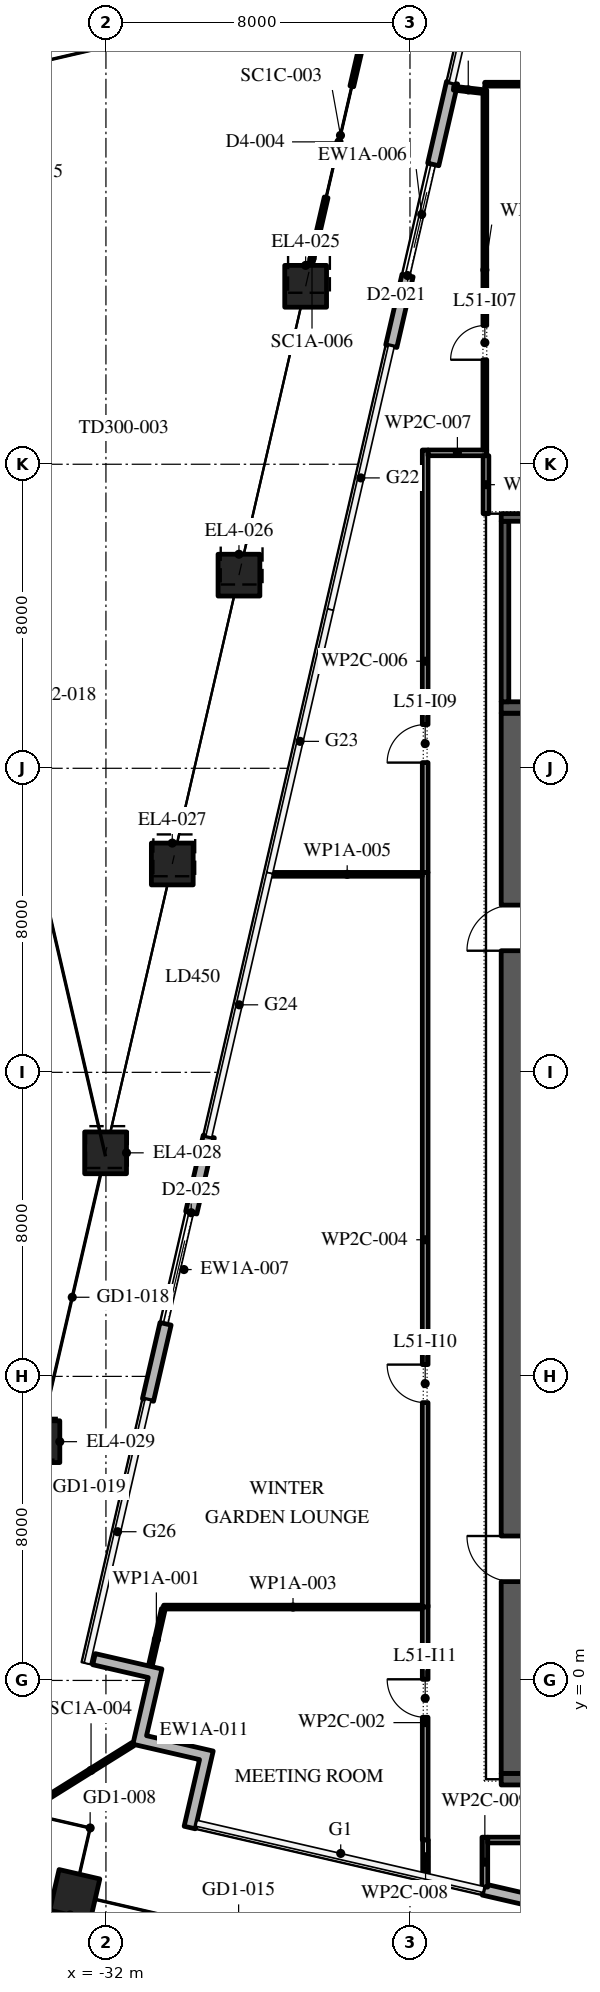
"""IFC4 building model, lengths in metres.
Left out: names, types, materials, properties, quantities, classifications, styles, units other than length and angle.
Written with IfcOpenShell. Run it as: python <this file> out.ifc"""

import sys

from ifc_helpers import new_model, si_unit, direction, frame, frame_2d, origin, origin_2d, place, context, subcontext, project, spatial, polyline, rectangle, outline, extrude, element, fill, save


model = new_model("IFC4")
c1 = context("Model", 3, precision=1e-05, world=origin(), true_north=direction((0.0, 1.0)))
c2 = subcontext(c1, "Body", "Model", "MODEL_VIEW")
j1 = project(units=[si_unit("LENGTHUNIT", "METRE"), si_unit("PLANEANGLEUNIT", "RADIAN")], contexts=[c1])
p1 = place(None, origin())
s1 = spatial("IfcSite", under=j1, at=p1, CompositionType="ELEMENT")
p2 = place(p1, origin())
s2 = spatial("IfcBuilding", under=s1, at=p2, CompositionType="ELEMENT")
p3 = place(p2, frame((0.0, 0.0, 237.0)))
s3 = spatial("IfcBuildingStorey", under=s2, at=p3, CompositionType="ELEMENT", Elevation=237.0)
p4 = place(p3, frame((-32.821, -5.635, 0.0), z_axis=(0.0, 0.0, 1.0), x_axis=(0.974370064785, -0.224951054344, 0.0)))
e1 = element("IfcColumn", 1, at=p4, inside=s3, PredefinedType="COLUMN", context=c2, shape_type="SweptSolid", body=[
    extrude(rectangle(XDim=1.1, YDim=1.1, at=origin_2d()), origin(), (0.0, 0.0, 1.0), 6.0),
])
p5 = place(p3, frame((-26.745, 36.682, 0.0), z_axis=(0.014577044955, 0.063140125085, 0.997898208418), x_axis=(-0.974370069894, 0.224951032214, 0.0)))
e2 = element("IfcColumn", 2, at=p5, inside=s3, PredefinedType="COLUMN", context=c2, shape_type="SweptSolid", body=[
    extrude(rectangle(XDim=1.1, YDim=1.1, at=origin_2d()), origin(), (0.0, 0.0, 1.0), 6.013),
])
p6 = place(p3, frame((-28.5, 29.082, 0.0), z_axis=(0.011702964216, 0.050550303766, 0.998652946432), x_axis=(-0.974232565058, 0.225545802843, 0.0)))
e3 = element("IfcColumn", 3, at=p6, inside=s3, PredefinedType="COLUMN", context=c2, shape_type="SweptSolid", body=[
    extrude(rectangle(XDim=1.1, YDim=1.1, at=origin_2d()), origin(), (0.0, 0.0, 1.0), 6.008),
])
p7 = place(p3, frame((-30.255, 21.482, 0.0), z_axis=(0.008782396982, 0.037935075853, 0.999241612186), x_axis=(-0.974232565058, 0.225545802843, 0.0)))
e4 = element("IfcColumn", 4, at=p7, inside=s3, PredefinedType="COLUMN", context=c2, shape_type="SweptSolid", body=[
    extrude(rectangle(XDim=1.1, YDim=1.1, at=origin_2d()), origin(), (0.0, 0.0, 1.0), 6.005),
])
p8 = place(p3, frame((-32.009, 13.882, 0.0), z_axis=(0.005857398783, 0.025300708632, 0.999662725634), x_axis=(-0.974232565058, 0.225545802843, 0.0)))
e5 = element("IfcColumn", 5, at=p8, inside=s3, PredefinedType="COLUMN", context=c2, shape_type="SweptSolid", body=[
    extrude(rectangle(XDim=1.1, YDim=1.1, at=origin_2d()), origin(), (0.0, 0.0, 1.0), 6.002),
])
p9 = place(p3, frame((-33.764, 6.282, 0.0), z_axis=(0.002929440379, 0.012653554971, 0.999915649405), x_axis=(-0.974232565058, 0.225545802843, 0.0)))
e6 = element("IfcColumn", 6, at=p9, inside=s3, PredefinedType="COLUMN", context=c2, shape_type="SweptSolid", body=[
    extrude(rectangle(XDim=1.1, YDim=1.1, at=origin_2d()), origin(), (0.0, 0.0, 1.0), 6.0),
])
p10 = place(p3, frame((-22.065, -5.502, 0.0), z_axis=(0.0, 0.0, 1.0), x_axis=(0.974372279954, -0.224941459176, 0.0)))
e7 = element("IfcWall", 7, at=p10, inside=s3, PredefinedType="STANDARD", context=c2, shape_type="SweptSolid", body=[
    extrude(rectangle(XDim=8.05, YDim=0.3, at=frame_2d((4.025, 0.0))), origin(), (0.0, 0.0, 1.0), 5.8),
])
p11 = place(p10, frame((2.525, 0.0, 0.0)))
e8 = element("IfcOpeningElement", 8, at=p11, cuts=e7, PredefinedType="OPENING", context=c2, shape_type="SweptSolid", body=[
    extrude(rectangle(XDim=3.0, YDim=3.5, at=frame_2d((1.5, 1.75))), frame((0.0, 0.16, 0.0), z_axis=(0.0, -1.0, 0.0), x_axis=(1.0, 0.0, 0.0)), (0.0, 0.0, 1.0), 0.32),
])
p12 = place(p3, frame((-22.892, 42.039, 0.0), z_axis=(0.0, 0.0, 1.0), x_axis=(-0.224982313536, -0.974362847504, 0.0)))
e9 = element("IfcWall", 9, at=p12, inside=s3, PredefinedType="STANDARD", context=c2, shape_type="SweptSolid", body=[
    extrude(rectangle(XDim=7.114, YDim=0.3, at=frame_2d((3.557, 0.0))), origin(), (0.0, 0.0, 1.0), 5.8),
])
p13 = place(p12, frame((2.207, 0.0, 0.0)))
e10 = element("IfcOpeningElement", 10, at=p13, cuts=e9, PredefinedType="OPENING", context=c2, shape_type="SweptSolid", body=[
    extrude(rectangle(XDim=3.0, YDim=3.5, at=frame_2d((1.5, 1.75))), frame((0.0, 0.16, 0.0), z_axis=(0.0, -1.0, 0.0), x_axis=(1.0, 0.0, 0.0)), (0.0, 0.0, 1.0), 0.32),
])
p14 = place(p3, frame((-29.293, 14.311, 0.0), z_axis=(0.0, 0.0, 1.0), x_axis=(-0.224949733175, -0.9743703698, 0.0)))
e11 = element("IfcWall", 11, at=p14, inside=s3, PredefinedType="STANDARD", context=c2, shape_type="SweptSolid", body=[
    extrude(rectangle(XDim=7.114, YDim=0.3, at=frame_2d((3.557, 0.0))), origin(), (0.0, 0.0, 1.0), 5.8),
])
p15 = place(p14, frame((2.057, 0.0, 0.0)))
e12 = element("IfcOpeningElement", 12, at=p15, cuts=e11, PredefinedType="OPENING", context=c2, shape_type="SweptSolid", body=[
    extrude(rectangle(XDim=3.0, YDim=3.5, at=frame_2d((1.5, 1.75))), frame((0.0, 0.16, 0.0), z_axis=(0.0, -1.0, 0.0), x_axis=(1.0, 0.0, 0.0)), (0.0, 0.0, 1.0), 0.32),
])
p16 = place(p3, origin())
e13 = element("IfcWall", 13, at=p16, inside=s3, PredefinedType="STANDARD", context=c2, shape_type="SweptSolid", body=[
    extrude(outline(polyline([(-31.291, -1.678), (-30.886, 0.076), (-32.348, 0.413), (-32.28, 0.705), (-30.526, 0.301), (-30.931, -1.453), (-29.177, -1.858), (-29.65, -3.905), (-29.942, -3.837), (-29.537, -2.083), (-31.291, -1.678)])), origin(), (0.0, 0.0, 1.0), 5.8),
])
p17 = place(p3, frame((-31.291, -1.678, 0.0), z_axis=(0.0, 0.0, 1.0), x_axis=(-0.84807753525, -0.529872148923, 0.0)))
e14 = element("IfcWall", 14, at=p17, inside=s3, PredefinedType="STANDARD", context=c2, shape_type="SweptSolid", body=[
    extrude(rectangle(XDim=2.596, YDim=0.1, at=frame_2d((1.298, 0.0))), origin(), (0.0, 0.0, 1.0), 5.8),
])
p18 = place(p3, frame((-25.119, 43.727, 0.0), z_axis=(0.0, 0.0, 1.0), x_axis=(-0.224972527218, -0.974365107132, 0.0)))
e15 = element("IfcWall", 15, at=p18, inside=s3, PredefinedType="STANDARD", context=c2, shape_type="SweptSolid", body=[
    extrude(rectangle(XDim=6.311, YDim=0.1, at=frame_2d((3.155, 0.0))), origin(), (0.0, 0.0, 1.0), 4.85),
])
p19 = place(p18, frame((1.83, 0.0, 0.0)))
e16 = element("IfcOpeningElement", 16, at=p19, cuts=e15, PredefinedType="OPENING", context=c2, shape_type="SweptSolid", body=[
    extrude(rectangle(XDim=3.0, YDim=3.5, at=frame_2d((1.5, 1.75))), frame((0.0, 0.06, 0.0), z_axis=(0.0, -1.0, 0.0), x_axis=(1.0, 0.0, 0.0)), (0.0, 0.0, 1.0), 0.12),
])
p20 = place(p3, frame((-21.3, -2.45, 0.0), z_axis=(0.0, 0.0, 1.0), x_axis=(0.0, 1.0, 0.0)))
e17 = element("IfcWall", 17, at=p20, inside=s3, PredefinedType="SHEAR", context=c2, shape_type="SweptSolid", body=[
    extrude(rectangle(XDim=27.9, YDim=0.6, at=frame_2d((13.95, 0.0))), origin(), (0.0, 0.0, 1.0), 5.8),
])
p21 = place(p20, frame((5.05, 0.0, 0.0)))
e18 = element("IfcOpeningElement", 18, at=p21, cuts=e17, PredefinedType="OPENING", context=c2, shape_type="SweptSolid", body=[
    extrude(rectangle(XDim=1.2, YDim=2.1, at=frame_2d((0.6, 1.05))), frame((0.0, 0.31, 0.0), z_axis=(0.0, -1.0, 0.0), x_axis=(1.0, 0.0, 0.0)), (0.0, 0.0, 1.0), 0.62),
])
p22 = place(p20, frame((21.65, 0.0, 0.0)))
e19 = element("IfcOpeningElement", 19, at=p22, cuts=e17, PredefinedType="OPENING", context=c2, shape_type="SweptSolid", body=[
    extrude(rectangle(XDim=1.2, YDim=2.1, at=frame_2d((0.6, 1.05))), frame((0.0, 0.31, 0.0), z_axis=(0.0, -1.0, 0.0), x_axis=(1.0, 0.0, 0.0)), (0.0, 0.0, 1.0), 0.62),
])
for number, where, z_axis, x_axis in (
    (20, (-21.6, -2.6, 0.0), (0.0, 0.0, 1.0), (1.0, 0.0, 0.0)),
    (21, (-21.6, 25.6, 0.0), (0.0, 0.0, 1.0), (1.0, 0.0, 0.0)),
):
    element("IfcWall", number, at=place(p3, frame(where, z_axis=z_axis, x_axis=x_axis)), inside=s3, PredefinedType="SHEAR", context=c2, shape_type="SweptSolid", body=[
        extrude(rectangle(XDim=11.2, YDim=0.3, at=frame_2d((5.6, 0.0))), origin(), (0.0, 0.0, 1.0), 5.8),
    ])
p23 = place(p3, frame((-21.5, 25.75, 0.0), z_axis=(0.0, 0.0, 1.0), x_axis=(0.0, 1.0, 0.0)))
e22 = element("IfcWall", 22, at=p23, inside=s3, PredefinedType="SHEAR", context=c2, shape_type="SweptSolid", body=[
    extrude(rectangle(XDim=4.75, YDim=0.2, at=frame_2d((2.375, 0.0))), origin(), (0.0, 0.0, 1.0), 5.8),
])
p24 = place(p3, frame((-21.6, 30.6, 0.0), z_axis=(0.0, 0.0, 1.0), x_axis=(1.0, 0.0, 0.0)))
e23 = element("IfcWall", 23, at=p24, inside=s3, PredefinedType="SHEAR", context=c2, shape_type="SweptSolid", body=[
    extrude(rectangle(XDim=11.2, YDim=0.2, at=frame_2d((5.6, 0.0))), origin(), (0.0, 0.0, 1.0), 5.8),
])
p25 = place(p3, frame((-30.49, 1.88, 0.0), z_axis=(0.0, 0.0, 1.0), x_axis=(-0.222184834458, -0.975004563752, 0.0)))
e24 = element("IfcWall", 24, at=p25, inside=s3, PredefinedType="PARTITIONING", context=c2, shape_type="SweptSolid", body=[
    extrude(rectangle(XDim=1.647, YDim=0.1, at=frame_2d((0.824, 0.0))), origin(), (0.0, 0.0, 1.0), 5.8),
])
p26 = place(p3, frame((-23.6, -4.2, 0.0), z_axis=(0.0, 0.0, 1.0), x_axis=(0.0, 1.0, 0.0)))
e25 = element("IfcWall", 25, at=p26, inside=s3, PredefinedType="PARTITIONING", context=c2, shape_type="SweptSolid", body=[
    extrude(rectangle(XDim=6.18, YDim=0.15, at=frame_2d((3.09, 0.0))), origin(), (0.0, 0.0, 1.0), 5.8),
])
p27 = place(p26, frame((3.23, 0.0, 0.0)))
e26 = element("IfcOpeningElement", 26, at=p27, cuts=e25, PredefinedType="OPENING", context=c2, shape_type="SweptSolid", body=[
    extrude(rectangle(XDim=1.0, YDim=2.1, at=frame_2d((0.5, 1.05))), frame((0.0, 0.085, 0.0), z_axis=(0.0, -1.0, 0.0), x_axis=(1.0, 0.0, 0.0)), (0.0, 0.0, 1.0), 0.17),
])
p28 = place(p3, frame((-23.675, 1.93, 0.0), z_axis=(0.0, 0.0, 1.0), x_axis=(-1.0, 0.0, 0.0)))
e27 = element("IfcWall", 27, at=p28, inside=s3, PredefinedType="PARTITIONING", context=c2, shape_type="SweptSolid", body=[
    extrude(rectangle(XDim=6.805, YDim=0.1, at=frame_2d((3.402, 0.0))), origin(), (0.0, 0.0, 1.0), 5.8),
])
p29 = place(p3, frame((-23.6, 1.93, 0.0), z_axis=(0.0, 0.0, 1.0), x_axis=(0.0, 1.0, 0.0)))
e28 = element("IfcWall", 28, at=p29, inside=s3, PredefinedType="PARTITIONING", context=c2, shape_type="SweptSolid", body=[
    extrude(rectangle(XDim=19.33, YDim=0.15, at=frame_2d((9.665, 0.0))), origin(), (0.0, 0.0, 1.0), 5.8),
])
p30 = place(p29, frame((5.38, 0.0, 0.0)))
e29 = element("IfcOpeningElement", 29, at=p30, cuts=e28, PredefinedType="OPENING", context=c2, shape_type="SweptSolid", body=[
    extrude(rectangle(XDim=1.0, YDim=2.1, at=frame_2d((0.5, 1.05))), frame((0.0, 0.085, 0.0), z_axis=(0.0, -1.0, 0.0), x_axis=(1.0, 0.0, 0.0)), (0.0, 0.0, 1.0), 0.17),
])
p31 = place(p3, frame((-23.675, 21.21, 0.0), z_axis=(0.0, 0.0, 1.0), x_axis=(-1.0, 0.0, 0.0)))
e30 = element("IfcWall", 30, at=p31, inside=s3, PredefinedType="PARTITIONING", context=c2, shape_type="SweptSolid", body=[
    extrude(rectangle(XDim=3.954, YDim=0.1, at=frame_2d((1.977, 0.0))), origin(), (0.0, 0.0, 1.0), 5.8),
])
p32 = place(p3, frame((-23.6, 21.26, 0.0), z_axis=(0.0, 0.0, 1.0), x_axis=(0.0, 1.0, 0.0)))
e31 = element("IfcWall", 31, at=p32, inside=s3, PredefinedType="PARTITIONING", context=c2, shape_type="SweptSolid", body=[
    extrude(rectangle(XDim=11.115, YDim=0.15, at=frame_2d((5.558, 0.0))), origin(), (0.0, 0.0, 1.0), 5.8),
])
p33 = place(p32, frame((2.89, 0.0, 0.0)))
e32 = element("IfcOpeningElement", 32, at=p33, cuts=e31, PredefinedType="OPENING", context=c2, shape_type="SweptSolid", body=[
    extrude(rectangle(XDim=1.0, YDim=2.1, at=frame_2d((0.5, 1.05))), frame((0.0, 0.085, 0.0), z_axis=(0.0, -1.0, 0.0), x_axis=(1.0, 0.0, 0.0)), (0.0, 0.0, 1.0), 0.17),
])
p34 = place(p3, frame((-23.525, 32.3, 0.0), z_axis=(0.0, 0.0, 1.0), x_axis=(1.0, 0.0, 0.0)))
e33 = element("IfcWall", 33, at=p34, inside=s3, PredefinedType="PARTITIONING", context=c2, shape_type="SweptSolid", body=[
    extrude(rectangle(XDim=1.545, YDim=0.15, at=frame_2d((0.772, 0.0))), origin(), (0.0, 0.0, 1.0), 5.8),
])
p35 = place(p3, frame((-23.59, -5.078, 0.0), z_axis=(0.0, 0.0, 1.0), x_axis=(0.0, 1.0, 0.0)))
e34 = element("IfcWall", 34, at=p35, inside=s3, PredefinedType="PARTITIONING", context=c2, shape_type="SweptSolid", body=[
    extrude(rectangle(XDim=0.878, YDim=0.15, at=frame_2d((0.439, 0.0))), origin(), (0.0, 0.0, 1.0), 5.8),
])
p36 = place(p3, frame((-22.03, -4.125, 0.0), z_axis=(0.0, 0.0, 1.0), x_axis=(0.0, -1.0, 0.0)))
e35 = element("IfcWall", 35, at=p36, inside=s3, PredefinedType="PARTITIONING", context=c2, shape_type="SweptSolid", body=[
    extrude(rectangle(XDim=1.313, YDim=0.15, at=frame_2d((0.656, 0.0))), origin(), (0.0, 0.0, 1.0), 5.8),
])
p37 = place(p3, frame((-22.03, 32.375, 0.0), z_axis=(0.0, 0.0, 1.0), x_axis=(0.0, 1.0, 0.0)))
e36 = element("IfcWall", 36, at=p37, inside=s3, PredefinedType="PARTITIONING", context=c2, shape_type="SweptSolid", body=[
    extrude(rectangle(XDim=9.475, YDim=0.1, at=frame_2d((4.738, 0.0))), origin(), (0.0, 0.0, 1.0), 5.8),
])
p38 = place(p37, frame((2.375, 0.0, 0.0)))
e37 = element("IfcOpeningElement", 37, at=p38, cuts=e36, PredefinedType="OPENING", context=c2, shape_type="SweptSolid", body=[
    extrude(rectangle(XDim=0.9, YDim=2.1, at=frame_2d((0.45, 1.05))), frame((0.0, 0.06, 0.0), z_axis=(0.0, -1.0, 0.0), x_axis=(1.0, 0.0, 0.0)), (0.0, 0.0, 1.0), 0.12),
])
p39 = place(p3, frame((-22.08, 41.806, 0.0), z_axis=(0.0, 0.0, 1.0), x_axis=(-0.99341992497, 0.114528829, 0.0)))
e38 = element("IfcWall", 38, at=p39, inside=s3, PredefinedType="PARTITIONING", context=c2, shape_type="SweptSolid", body=[
    extrude(rectangle(XDim=0.778, YDim=0.1, at=frame_2d((0.389, 0.0))), origin(), (0.0, 0.0, 1.0), 5.8),
])
p40 = place(p3, frame((-22.03, 42.0, 0.0), z_axis=(0.0, 0.0, 1.0), x_axis=(1.0, 0.0, 0.0)))
e39 = element("IfcWall", 39, at=p40, inside=s3, PredefinedType="PARTITIONING", context=c2, shape_type="SweptSolid", body=[
    extrude(rectangle(XDim=7.89, YDim=0.1, at=frame_2d((3.945, 0.0))), origin(), (0.0, 0.0, 1.0), 5.8),
])
p41 = place(p3, frame((-22.0, 32.225, 0.0), z_axis=(0.0, 0.0, 1.0), x_axis=(0.0, -1.0, 0.0)))
e40 = element("IfcWall", 40, at=p41, inside=s3, PredefinedType="PARTITIONING", context=c2, shape_type="SweptSolid", body=[
    extrude(rectangle(XDim=1.525, YDim=0.15, at=frame_2d((0.763, 0.0))), origin(), (0.0, 0.0, 1.0), 5.8),
])
p42 = place(p3, frame((-10.075, -4.2, 0.0), z_axis=(0.0, 0.0, 1.0), x_axis=(-1.0, 0.0, 0.0)))
e41 = element("IfcWall", 41, at=p42, inside=s3, PredefinedType="PARTITIONING", context=c2, shape_type="SweptSolid", body=[
    extrude(rectangle(XDim=11.88, YDim=0.15, at=frame_2d((5.94, 0.0))), origin(), (0.0, 0.0, 1.0), 5.8),
])
p43 = place(p42, frame((4.305, 0.0, 0.0)))
e42 = element("IfcOpeningElement", 42, at=p43, cuts=e41, PredefinedType="OPENING", context=c2, shape_type="SweptSolid", body=[
    extrude(rectangle(XDim=1.0, YDim=2.1, at=frame_2d((0.5, 1.05))), frame((0.0, 0.085, 0.0), z_axis=(0.0, -1.0, 0.0), x_axis=(1.0, 0.0, 0.0)), (0.0, 0.0, 1.0), 0.17),
])
p44 = place(p3, frame((-26.539, 37.578, 0.0), z_axis=(0.0, 0.0, 1.0), x_axis=(-0.224910518966, -0.974379422227, 0.0)))
e43 = element("IfcWall", 43, at=p44, inside=s3, PredefinedType="STANDARD", context=c2, shape_type="SweptSolid", body=[
    extrude(rectangle(XDim=0.35, YDim=0.1, at=frame_2d((0.175, 0.0))), origin(), (0.0, 0.0, 1.0), 5.8),
])
p45 = place(p13, origin())
e44 = element("IfcDoor", 44, at=p45, inside=s3, OperationType="DOUBLE_DOOR_SLIDING", PredefinedType="DOOR", context=c2, shape_type="SweptSolid", body=[
    extrude(rectangle(XDim=3.0, YDim=3.5, at=frame_2d((1.5, 1.75))), frame((0.0, 0.025, 0.0), z_axis=(0.0, -1.0, 0.0), x_axis=(1.0, 0.0, 0.0)), (0.0, 0.0, 1.0), 0.05),
])
fill(e10, e44)
p46 = place(p15, origin())
e45 = element("IfcDoor", 45, at=p46, inside=s3, OperationType="DOUBLE_DOOR_SLIDING", PredefinedType="DOOR", context=c2, shape_type="SweptSolid", body=[
    extrude(rectangle(XDim=3.0, YDim=3.5, at=frame_2d((1.5, 1.75))), frame((0.0, 0.025, 0.0), z_axis=(0.0, -1.0, 0.0), x_axis=(1.0, 0.0, 0.0)), (0.0, 0.0, 1.0), 0.05),
])
fill(e12, e45)
p47 = place(p19, origin())
e46 = element("IfcDoor", 46, at=p47, inside=s3, OperationType="DOUBLE_DOOR_SLIDING", PredefinedType="DOOR", context=c2, shape_type="SweptSolid", body=[
    extrude(rectangle(XDim=3.0, YDim=3.5, at=frame_2d((1.5, 1.75))), frame((0.0, 0.025, 0.0), z_axis=(0.0, -1.0, 0.0), x_axis=(1.0, 0.0, 0.0)), (0.0, 0.0, 1.0), 0.05),
])
fill(e16, e46)
p48 = place(p21, origin())
e47 = element("IfcDoor", 47, at=p48, inside=s3, OperationType="SINGLE_SWING_LEFT", PredefinedType="DOOR", context=c2, shape_type="SweptSolid", body=[
    extrude(rectangle(XDim=1.2, YDim=2.1, at=frame_2d((0.6, 1.05))), frame((0.0, 0.025, 0.0), z_axis=(0.0, -1.0, 0.0), x_axis=(1.0, 0.0, 0.0)), (0.0, 0.0, 1.0), 0.05),
])
fill(e18, e47)
p49 = place(p22, origin())
e48 = element("IfcDoor", 48, at=p49, inside=s3, OperationType="SINGLE_SWING_RIGHT", PredefinedType="DOOR", context=c2, shape_type="SweptSolid", body=[
    extrude(rectangle(XDim=1.2, YDim=2.1, at=frame_2d((0.6, 1.05))), frame((0.0, 0.025, 0.0), z_axis=(0.0, -1.0, 0.0), x_axis=(1.0, 0.0, 0.0)), (0.0, 0.0, 1.0), 0.05),
])
fill(e19, e48)
p50 = place(p38, origin())
e49 = element("IfcDoor", 49, at=p50, inside=s3, OperationType="SINGLE_SWING_RIGHT", PredefinedType="DOOR", context=c2, shape_type="SweptSolid", body=[
    extrude(rectangle(XDim=0.9, YDim=2.1, at=frame_2d((0.45, 1.05))), frame((0.0, 0.025, 0.0), z_axis=(0.0, -1.0, 0.0), x_axis=(1.0, 0.0, 0.0)), (0.0, 0.0, 1.0), 0.05),
])
fill(e37, e49)
p51 = place(p33, origin())
e50 = element("IfcDoor", 50, at=p51, inside=s3, OperationType="SINGLE_SWING_RIGHT", PredefinedType="DOOR", context=c2, shape_type="SweptSolid", body=[
    extrude(rectangle(XDim=1.0, YDim=2.1, at=frame_2d((0.5, 1.05))), frame((0.0, 0.025, 0.0), z_axis=(0.0, -1.0, 0.0), x_axis=(1.0, 0.0, 0.0)), (0.0, 0.0, 1.0), 0.05),
])
fill(e32, e50)
p52 = place(p30, origin())
e51 = element("IfcDoor", 51, at=p52, inside=s3, OperationType="SINGLE_SWING_LEFT", PredefinedType="DOOR", context=c2, shape_type="SweptSolid", body=[
    extrude(rectangle(XDim=1.0, YDim=2.1, at=frame_2d((0.5, 1.05))), frame((0.0, 0.025, 0.0), z_axis=(0.0, -1.0, 0.0), x_axis=(1.0, 0.0, 0.0)), (0.0, 0.0, 1.0), 0.05),
])
fill(e29, e51)
p53 = place(p27, origin())
e52 = element("IfcDoor", 52, at=p53, inside=s3, OperationType="SINGLE_SWING_LEFT", PredefinedType="DOOR", context=c2, shape_type="SweptSolid", body=[
    extrude(rectangle(XDim=1.0, YDim=2.1, at=frame_2d((0.5, 1.05))), frame((0.0, 0.025, 0.0), z_axis=(0.0, -1.0, 0.0), x_axis=(1.0, 0.0, 0.0)), (0.0, 0.0, 1.0), 0.05),
])
fill(e26, e52)
save(model, sys.argv[1])
